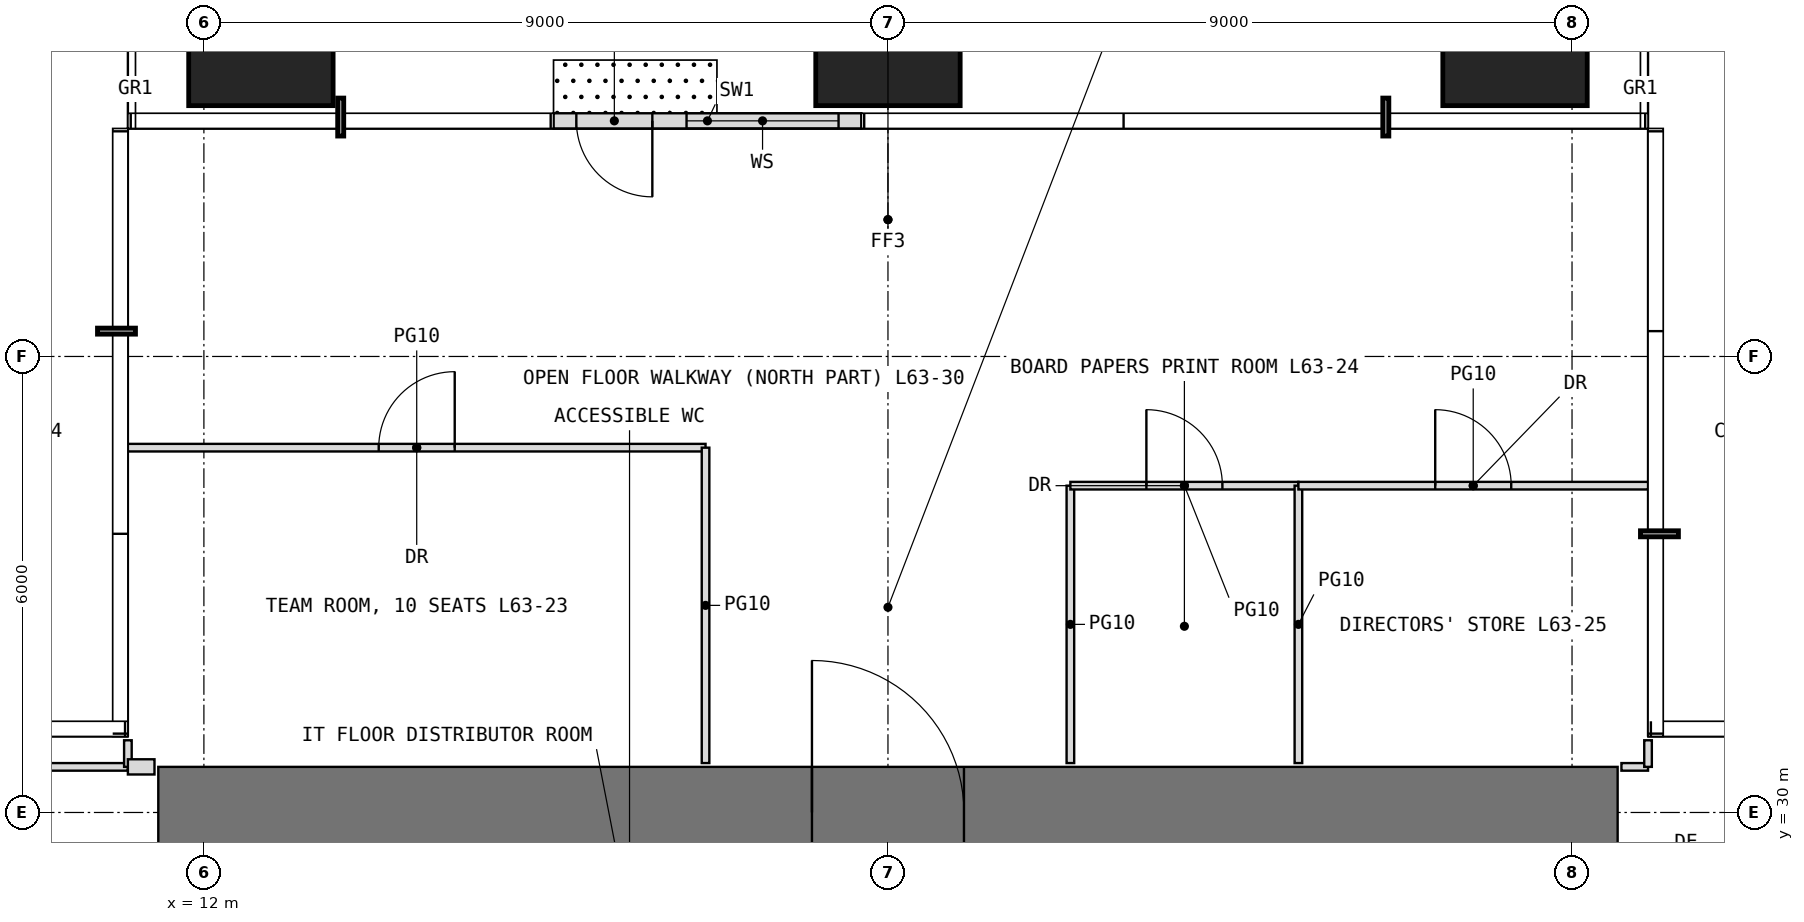
"""IFC4 building model, lengths in metres.
Left out: names, types, materials, properties, quantities, classifications, styles, units other than length and angle.
Written with IfcOpenShell. Run it as: python <this file> out.ifc"""

import sys

from ifc_helpers import new_model, si_unit, direction, frame, frame_2d, origin, origin_2d, place, context, subcontext, project, spatial, rectangle, extrude, element, fill, save


model = new_model("IFC4")
c1 = context("Model", 3, precision=1e-05, world=origin(), true_north=direction((0.0, 1.0)))
c2 = subcontext(c1, "Body", "Model", "MODEL_VIEW")
j1 = project(units=[si_unit("LENGTHUNIT", "METRE"), si_unit("PLANEANGLEUNIT", "RADIAN")], contexts=[c1])
p1 = place(None, origin())
s1 = spatial("IfcSite", under=j1, at=p1, CompositionType="ELEMENT")
p2 = place(p1, origin())
s2 = spatial("IfcBuilding", under=s1, at=p2, CompositionType="ELEMENT")
p3 = place(p2, frame((0.0, 0.0, 265.0)))
s3 = spatial("IfcBuildingStorey", under=s2, at=p3, CompositionType="ELEMENT", Elevation=265.0)
for number, where, z_axis, x_axis in (
    (1, (12.75, 40.25, 0.0), (0.0, 0.0, 1.0), (1.0, 0.0, 0.0)),
    (2, (21.0, 40.25, 0.0), (0.0, 0.0, 1.0), (1.0, 0.0, 0.0)),
    (3, (29.25, 40.25, 0.0), (0.0, 0.0, 1.0), (1.0, 0.0, 0.0)),
):
    element("IfcColumn", number, at=place(p3, frame(where, z_axis=z_axis, x_axis=x_axis)), inside=s3, PredefinedType="COLUMN", context=c2, shape_type="SweptSolid", body=[
        extrude(rectangle(XDim=1.9, YDim=1.9, at=origin_2d()), origin(), (0.0, 0.0, 1.0), 4.2),
    ])
p4 = place(p3, frame((20.65, 39.1, 0.0), z_axis=(0.0, 0.0, 1.0), x_axis=(-1.0, 0.0, 0.0)))
e4 = element("IfcWall", 4, at=p4, inside=s3, PredefinedType="USERDEFINED", context=c2, shape_type="SweptSolid", body=[
    extrude(rectangle(XDim=4.05, YDim=0.2, at=frame_2d((2.025, 0.0))), origin(), (0.0, 0.0, 1.0), 3.95),
])
p5 = place(p4, frame((2.75, 0.0, 0.0)))
e5 = element("IfcOpeningElement", 5, at=p5, cuts=e4, PredefinedType="OPENING", context=c2, shape_type="SweptSolid", body=[
    extrude(rectangle(XDim=1.0, YDim=2.4, at=frame_2d((0.5, 1.2))), frame((0.0, 0.11, 0.0), z_axis=(0.0, -1.0, 0.0), x_axis=(1.0, 0.0, 0.0)), (0.0, 0.0, 1.0), 0.22),
])
p6 = place(p4, frame((0.3, 0.0, 0.3)))
e6 = element("IfcOpeningElement", 6, at=p6, cuts=e4, PredefinedType="OPENING", context=c2, shape_type="SweptSolid", body=[
    extrude(rectangle(XDim=2.0, YDim=2.7, at=frame_2d((1.0, 1.35))), frame((0.0, 0.11, 0.0), z_axis=(0.0, -1.0, 0.0), x_axis=(1.0, 0.0, 0.0)), (0.0, 0.0, 1.0), 0.22),
])
p7 = place(p3, frame((11.4, 30.0, -0.05), z_axis=(0.0, 0.0, 1.0), x_axis=(1.0, 0.0, 0.0)))
e7 = element("IfcWall", 7, at=p7, inside=s3, PredefinedType="SHEAR", context=c2, shape_type="SweptSolid", body=[
    extrude(rectangle(XDim=19.2, YDim=1.2, at=frame_2d((9.6, 0.0))), origin(), (0.0, 0.0, 1.0), 4.2),
])
p8 = place(p7, frame((8.6, 0.0, 0.05)))
e8 = element("IfcOpeningElement", 8, at=p8, cuts=e7, PredefinedType="OPENING", context=c2, shape_type="SweptSolid", body=[
    extrude(rectangle(XDim=2.0, YDim=2.2, at=frame_2d((1.0, 1.1))), frame((0.0, 0.61, 0.0), z_axis=(0.0, -1.0, 0.0), x_axis=(1.0, 0.0, 0.0)), (0.0, 0.0, 1.0), 1.22),
])
p9 = place(p3, frame((8.0, 30.6, 0.0), z_axis=(0.0, 0.0, 1.0), x_axis=(1.0, 0.0, 0.0)))
e9 = element("IfcWall", 9, at=p9, inside=s3, PredefinedType="PARTITIONING", context=c2, shape_type="SweptSolid", body=[
    extrude(rectangle(XDim=3.0, YDim=0.1, at=frame_2d((1.5, 0.0))), origin(), (0.0, 0.0, 1.0), 3.95),
])
p10 = place(p3, frame((11.0, 30.6, 0.0), z_axis=(0.0, 0.0, 1.0), x_axis=(0.0, 1.0, 0.0)))
e10 = element("IfcWall", 10, at=p10, inside=s3, PredefinedType="PARTITIONING", context=c2, shape_type="SweptSolid", body=[
    extrude(rectangle(XDim=0.35, YDim=0.1, at=frame_2d((0.175, 0.0))), origin(), (0.0, 0.0, 1.0), 3.95),
])
p11 = place(p3, frame((11.0, 30.6, 0.0), z_axis=(0.0, 0.0, 1.0), x_axis=(1.0, 0.0, 0.0)))
e11 = element("IfcWall", 11, at=p11, inside=s3, PredefinedType="PARTITIONING", context=c2, shape_type="SweptSolid", body=[
    extrude(rectangle(XDim=0.35, YDim=0.2, at=frame_2d((0.175, 0.0))), origin(), (0.0, 0.0, 1.0), 3.95),
])
p12 = place(p3, frame((11.0, 34.8, 0.0), z_axis=(0.0, 0.0, 1.0), x_axis=(1.0, 0.0, 0.0)))
e12 = element("IfcWall", 12, at=p12, inside=s3, PredefinedType="PARTITIONING", context=c2, shape_type="SweptSolid", body=[
    extrude(rectangle(XDim=7.6, YDim=0.1, at=frame_2d((3.8, 0.0))), origin(), (0.0, 0.0, 1.0), 3.95),
])
p13 = place(p12, frame((3.3, 0.0, 0.0)))
e13 = element("IfcOpeningElement", 13, at=p13, cuts=e12, PredefinedType="OPENING", context=c2, shape_type="SweptSolid", body=[
    extrude(rectangle(XDim=1.0, YDim=2.2, at=frame_2d((0.5, 1.1))), frame((0.0, 0.06, 0.0), z_axis=(0.0, -1.0, 0.0), x_axis=(1.0, 0.0, 0.0)), (0.0, 0.0, 1.0), 0.12),
])
p14 = place(p3, frame((18.6, 30.65, 0.0), z_axis=(0.0, 0.0, 1.0), x_axis=(0.0, 1.0, 0.0)))
e14 = element("IfcWall", 14, at=p14, inside=s3, PredefinedType="PARTITIONING", context=c2, shape_type="SweptSolid", body=[
    extrude(rectangle(XDim=4.15, YDim=0.1, at=frame_2d((2.075, 0.0))), origin(), (0.0, 0.0, 1.0), 3.95),
])
p15 = place(p3, frame((23.4, 30.65, 0.0), z_axis=(0.0, 0.0, 1.0), x_axis=(0.0, 1.0, 0.0)))
e15 = element("IfcWall", 15, at=p15, inside=s3, PredefinedType="PARTITIONING", context=c2, shape_type="SweptSolid", body=[
    extrude(rectangle(XDim=3.65, YDim=0.1, at=frame_2d((1.825, 0.0))), origin(), (0.0, 0.0, 1.0), 3.95),
])
p16 = place(p3, frame((23.4, 34.3, 0.0), z_axis=(0.0, 0.0, 1.0), x_axis=(1.0, 0.0, 0.0)))
e16 = element("IfcWall", 16, at=p16, inside=s3, PredefinedType="PARTITIONING", context=c2, shape_type="SweptSolid", body=[
    extrude(rectangle(XDim=3.0, YDim=0.1, at=frame_2d((1.5, 0.0))), origin(), (0.0, 0.0, 1.0), 3.95),
])
p17 = place(p16, frame((1.0, 0.0, 0.0)))
e17 = element("IfcOpeningElement", 17, at=p17, cuts=e16, PredefinedType="OPENING", context=c2, shape_type="SweptSolid", body=[
    extrude(rectangle(XDim=1.0, YDim=2.2, at=frame_2d((0.5, 1.1))), frame((0.0, 0.06, 0.0), z_axis=(0.0, -1.0, 0.0), x_axis=(1.0, 0.0, 0.0)), (0.0, 0.0, 1.0), 0.12),
])
p18 = place(p3, frame((26.4, 30.65, 0.0), z_axis=(0.0, 0.0, 1.0), x_axis=(0.0, 1.0, 0.0)))
e18 = element("IfcWall", 18, at=p18, inside=s3, PredefinedType="PARTITIONING", context=c2, shape_type="SweptSolid", body=[
    extrude(rectangle(XDim=3.65, YDim=0.1, at=frame_2d((1.825, 0.0))), origin(), (0.0, 0.0, 1.0), 3.95),
])
p19 = place(p3, frame((26.4, 34.3, 0.0), z_axis=(0.0, 0.0, 1.0), x_axis=(1.0, 0.0, 0.0)))
e19 = element("IfcWall", 19, at=p19, inside=s3, PredefinedType="PARTITIONING", context=c2, shape_type="SweptSolid", body=[
    extrude(rectangle(XDim=4.6, YDim=0.1, at=frame_2d((2.3, 0.0))), origin(), (0.0, 0.0, 1.0), 3.95),
])
p20 = place(p19, frame((1.8, 0.0, 0.0)))
e20 = element("IfcOpeningElement", 20, at=p20, cuts=e19, PredefinedType="OPENING", context=c2, shape_type="SweptSolid", body=[
    extrude(rectangle(XDim=1.0, YDim=2.2, at=frame_2d((0.5, 1.1))), frame((0.0, 0.06, 0.0), z_axis=(0.0, -1.0, 0.0), x_axis=(1.0, 0.0, 0.0)), (0.0, 0.0, 1.0), 0.12),
])
p21 = place(p3, frame((30.65, 30.6, 0.0), z_axis=(0.0, 0.0, 1.0), x_axis=(1.0, 0.0, 0.0)))
e21 = element("IfcWall", 21, at=p21, inside=s3, PredefinedType="PARTITIONING", context=c2, shape_type="SweptSolid", body=[
    extrude(rectangle(XDim=0.35, YDim=0.1, at=frame_2d((0.175, 0.0))), origin(), (0.0, 0.0, 1.0), 3.95),
])
p22 = place(p3, frame((31.0, 30.6, 0.0), z_axis=(0.0, 0.0, 1.0), x_axis=(0.0, 1.0, 0.0)))
e22 = element("IfcWall", 22, at=p22, inside=s3, PredefinedType="PARTITIONING", context=c2, shape_type="SweptSolid", body=[
    extrude(rectangle(XDim=0.35, YDim=0.1, at=frame_2d((0.175, 0.0))), origin(), (0.0, 0.0, 1.0), 3.95),
])
p23 = place(p5, origin())
e23 = element("IfcDoor", 23, at=p23, inside=s3, OperationType="SINGLE_SWING_LEFT", PredefinedType="DOOR", context=c2, shape_type="SweptSolid", body=[
    extrude(rectangle(XDim=1.0, YDim=2.4, at=frame_2d((0.5, 1.2))), frame((0.0, 0.025, 0.0), z_axis=(0.0, -1.0, 0.0), x_axis=(1.0, 0.0, 0.0)), (0.0, 0.0, 1.0), 0.05),
])
fill(e5, e23)
p24 = place(p6, origin())
e24 = element("IfcWindow", 24, at=p24, inside=s3, PartitioningType="SINGLE_PANEL", PredefinedType="WINDOW", context=c2, shape_type="SweptSolid", body=[
    extrude(rectangle(XDim=2.0, YDim=2.7, at=frame_2d((1.0, 1.35))), frame((0.0, 0.03, 0.0), z_axis=(0.0, -1.0, 0.0), x_axis=(1.0, 0.0, 0.0)), (0.0, 0.0, 1.0), 0.06),
])
fill(e6, e24)
p25 = place(p8, origin())
e25 = element("IfcDoor", 25, at=p25, inside=s3, OperationType="DOUBLE_DOOR_SINGLE_SWING", PredefinedType="DOOR", context=c2, shape_type="SweptSolid", body=[
    extrude(rectangle(XDim=2.0, YDim=2.2, at=frame_2d((1.0, 1.1))), frame((0.0, 0.025, 0.0), z_axis=(0.0, -1.0, 0.0), x_axis=(1.0, 0.0, 0.0)), (0.0, 0.0, 1.0), 0.05),
])
fill(e8, e25)
p26 = place(p13, origin())
e26 = element("IfcDoor", 26, at=p26, inside=s3, OperationType="SINGLE_SWING_RIGHT", PredefinedType="DOOR", context=c2, shape_type="SweptSolid", body=[
    extrude(rectangle(XDim=1.0, YDim=2.2, at=frame_2d((0.5, 1.1))), frame((0.0, 0.025, 0.0), z_axis=(0.0, -1.0, 0.0), x_axis=(1.0, 0.0, 0.0)), (0.0, 0.0, 1.0), 0.05),
])
fill(e13, e26)
p27 = place(p17, origin())
e27 = element("IfcDoor", 27, at=p27, inside=s3, OperationType="SINGLE_SWING_LEFT", PredefinedType="DOOR", context=c2, shape_type="SweptSolid", body=[
    extrude(rectangle(XDim=1.0, YDim=2.2, at=frame_2d((0.5, 1.1))), frame((0.0, 0.025, 0.0), z_axis=(0.0, -1.0, 0.0), x_axis=(1.0, 0.0, 0.0)), (0.0, 0.0, 1.0), 0.05),
])
fill(e17, e27)
p28 = place(p20, origin())
e28 = element("IfcDoor", 28, at=p28, inside=s3, OperationType="SINGLE_SWING_LEFT", PredefinedType="DOOR", context=c2, shape_type="SweptSolid", body=[
    extrude(rectangle(XDim=1.0, YDim=2.2, at=frame_2d((0.5, 1.1))), frame((0.0, 0.025, 0.0), z_axis=(0.0, -1.0, 0.0), x_axis=(1.0, 0.0, 0.0)), (0.0, 0.0, 1.0), 0.05),
])
fill(e20, e28)
save(model, sys.argv[1])
